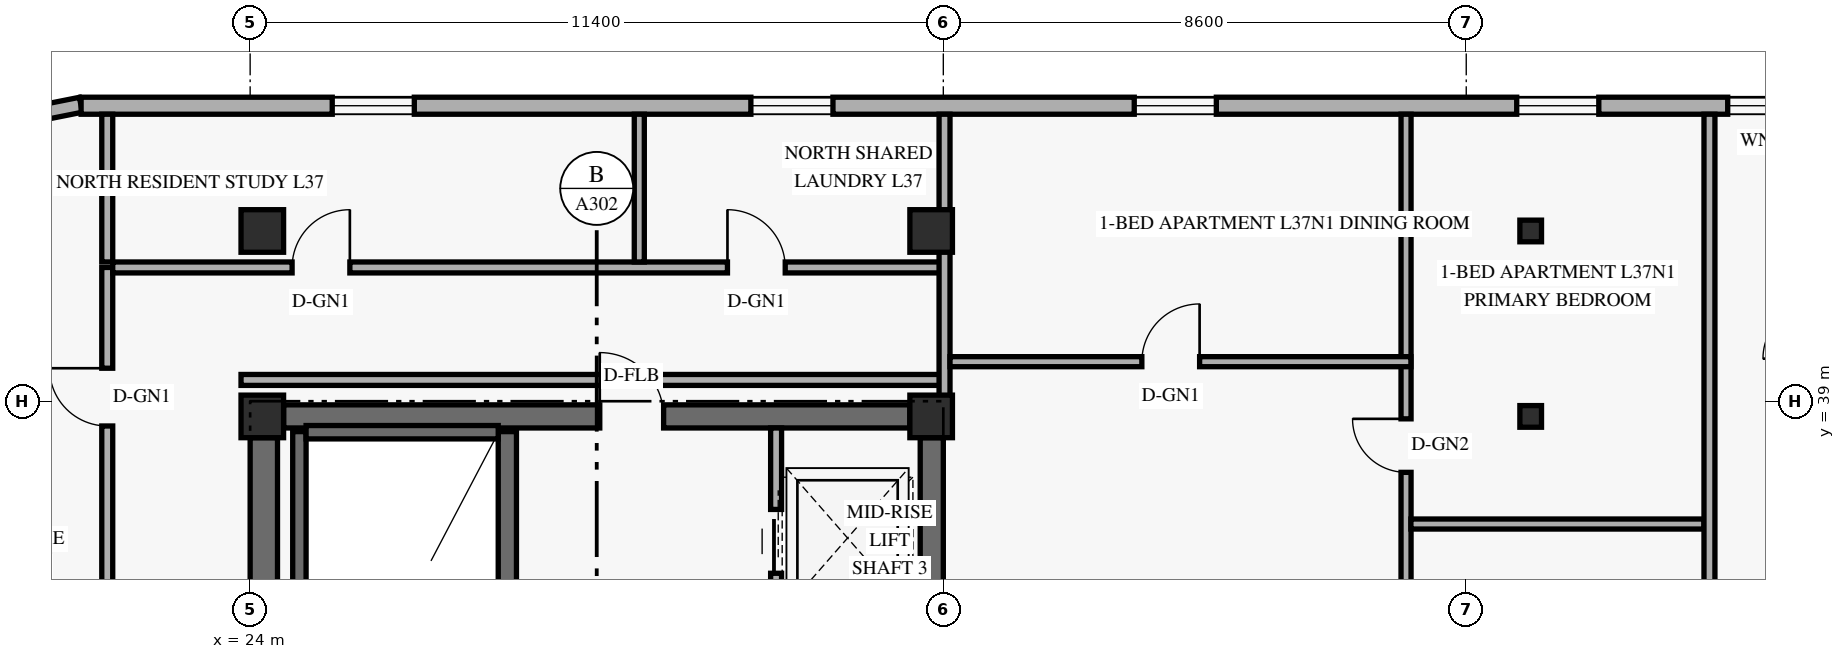
"""IFC4 building model, lengths in metres.
Left out: names, types, materials, properties, quantities, classifications, styles, units other than length and angle.
Written with IfcOpenShell. Run it as: python <this file> out.ifc"""

import sys

from ifc_helpers import new_model, si_unit, direction, frame, frame_2d, origin, origin_2d, place, context, subcontext, project, spatial, rectangle, hollow_rectangle, extrude, element, fill, save


model = new_model("IFC4")
c1 = context("Model", 3, precision=1e-05, world=origin(), true_north=direction((0.0, 1.0)))
c2 = subcontext(c1, "Body", "Model", "MODEL_VIEW")
j1 = project(units=[si_unit("LENGTHUNIT", "METRE"), si_unit("PLANEANGLEUNIT", "RADIAN")], contexts=[c1])
p1 = place(None, origin())
s1 = spatial("IfcSite", under=j1, at=p1, CompositionType="ELEMENT")
p2 = place(p1, origin())
s2 = spatial("IfcBuilding", under=s1, at=p2, CompositionType="ELEMENT")
p3 = place(p2, frame((0.0, 0.0, 144.6)))
s3 = spatial("IfcBuildingStorey", under=s2, at=p3, CompositionType="ELEMENT", Elevation=144.6)
p4 = place(p3, frame((24.225, 30.55, 0.0), z_axis=(0.0, 0.0, 1.0), x_axis=(0.0, 1.0, 0.0)))
e1 = element("IfcWall", 1, at=p4, inside=s3, PredefinedType="SHEAR", context=c2, shape_type="SweptSolid", body=[
    extrude(rectangle(XDim=7.85, YDim=0.45, at=frame_2d((3.925, 0.0))), origin(), (0.0, 0.0, 1.0), 2.748),
])
p5 = place(p3, frame((35.21, 31.35, 0.0), z_axis=(0.0, 0.0, 1.0), x_axis=(0.0, 1.0, 0.0)))
e2 = element("IfcWall", 2, at=p5, inside=s3, PredefinedType="SHEAR", context=c2, shape_type="SweptSolid", body=[
    extrude(rectangle(XDim=7.05, YDim=0.38, at=frame_2d((3.525, 0.0))), origin(), (0.0, 0.0, 1.0), 2.748),
])
p6 = place(p3, frame((24.55, 38.75, 0.0), z_axis=(0.0, 0.0, 1.0), x_axis=(1.0, 0.0, 0.0)))
e3 = element("IfcWall", 3, at=p6, inside=s3, PredefinedType="SHEAR", context=c2, shape_type="SweptSolid", body=[
    extrude(rectangle(XDim=10.3, YDim=0.38, at=frame_2d((5.15, 0.0))), origin(), (0.0, 0.0, 1.0), 3.36),
])
p7 = place(p6, frame((5.2, 0.0, 0.0)))
e4 = element("IfcOpeningElement", 4, at=p7, cuts=e3, PredefinedType="OPENING", context=c2, shape_type="SweptSolid", body=[
    extrude(rectangle(XDim=1.05, YDim=2.15, at=frame_2d((0.525, 1.075))), frame((0.0, 0.2, 0.0), z_axis=(0.0, -1.0, 0.0), x_axis=(1.0, 0.0, 0.0)), (0.0, 0.0, 1.0), 0.4),
])
p8 = place(p3, frame((24.81, 30.74, 0.0), z_axis=(0.0, 0.0, 1.0), x_axis=(0.0, 1.0, 0.0)))
e5 = element("IfcWall", 5, at=p8, inside=s3, PredefinedType="SHEAR", context=c2, shape_type="SweptSolid", body=[
    extrude(rectangle(XDim=7.76, YDim=0.22, at=frame_2d((3.88, 0.0))), origin(), (0.0, 0.0, 1.0), 3.36),
])
p9 = place(p3, frame((28.23, 30.74, 0.0), z_axis=(0.0, 0.0, 1.0), x_axis=(0.0, 1.0, 0.0)))
e6 = element("IfcWall", 6, at=p9, inside=s3, PredefinedType="SHEAR", context=c2, shape_type="SweptSolid", body=[
    extrude(rectangle(XDim=7.76, YDim=0.3, at=frame_2d((3.88, 0.0))), origin(), (0.0, 0.0, 1.0), 3.36),
])
p10 = place(p3, frame((24.92, 38.49, 0.0), z_axis=(0.0, 0.0, 1.0), x_axis=(1.0, 0.0, 0.0)))
e7 = element("IfcWall", 7, at=p10, inside=s3, PredefinedType="SHEAR", context=c2, shape_type="SweptSolid", body=[
    extrude(rectangle(XDim=3.16, YDim=0.22, at=frame_2d((1.58, 0.0))), origin(), (0.0, 0.0, 1.0), 3.36),
])
for number, where, z_axis, x_axis in (
    (8, (24.2, 38.75, 0.0), (0.0, 0.0, 1.0), (1.0, 0.0, 0.0)),
    (9, (24.2, 41.8, 0.0), (0.0, 0.0, 1.0), (1.0, 0.0, 0.0)),
    (10, (35.2, 38.75, 0.0), (0.0, 0.0, 1.0), (1.0, 0.0, 0.0)),
    (11, (35.2, 41.8, 0.0), (0.0, 0.0, 1.0), (1.0, 0.0, 0.0)),
):
    element("IfcColumn", number, at=place(p3, frame(where, z_axis=z_axis, x_axis=x_axis)), inside=s3, PredefinedType="COLUMN", context=c2, shape_type="SweptSolid", body=[
        extrude(rectangle(XDim=0.7, YDim=0.7, at=origin_2d()), origin(), (0.0, 0.0, 1.0), 3.6),
    ])
for number, where, z_axis, x_axis in (
    (12, (44.997, 38.75, 0.0), (0.035, 0.0, 0.999), (0.0, 1.0, 0.0)),
    (13, (44.997, 41.8, 0.0), (0.035, 0.0, 0.999), (0.0, 1.0, 0.0)),
):
    element("IfcColumn", number, at=place(p3, frame(where, z_axis=z_axis, x_axis=x_axis)), inside=s3, PredefinedType="COLUMN", context=c2, shape_type="SweptSolid", body=[
        extrude(hollow_rectangle(XDim=0.356, YDim=0.356, WallThickness=0.016, at=origin_2d()), origin(), (0.0, 0.0, 1.0), 3.602),
    ])
p11 = place(p3, frame((21.217, 43.876, 0.0), z_axis=(0.0, 0.0, 1.0), x_axis=(-0.980809899341, -0.19496651342, 0.0)))
e14 = element("IfcWall", 14, at=p11, inside=s3, PredefinedType="SOLIDWALL", context=c2, shape_type="SweptSolid", body=[
    extrude(rectangle(XDim=1.389, YDim=0.25, at=frame_2d((0.694, 0.0))), origin(), (0.0, 0.0, 1.0), 3.36),
])
p12 = place(p3, frame((54.98, 43.86, 0.0), z_axis=(0.0, 0.0, 1.0), x_axis=(-1.0, 0.0, 0.0)))
e15 = element("IfcWall", 15, at=p12, inside=s3, PredefinedType="SOLIDWALL", context=c2, shape_type="SweptSolid", body=[
    extrude(rectangle(XDim=33.76, YDim=0.28, at=frame_2d((16.88, 0.0))), origin(), (0.0, 0.0, 1.0), 3.36),
])
p13 = place(p12, frame((28.28, 0.0, 0.85)))
e16 = element("IfcOpeningElement", 16, at=p13, cuts=e15, PredefinedType="OPENING", context=c2, shape_type="SweptSolid", body=[
    extrude(rectangle(XDim=1.35, YDim=1.55, at=frame_2d((0.675, 0.775))), frame((0.0, 0.15, 0.0), z_axis=(0.0, -1.0, 0.0), x_axis=(1.0, 0.0, 0.0)), (0.0, 0.0, 1.0), 0.3),
])
p14 = place(p12, frame((21.395, 0.0, 0.85)))
e17 = element("IfcOpeningElement", 17, at=p14, cuts=e15, PredefinedType="OPENING", context=c2, shape_type="SweptSolid", body=[
    extrude(rectangle(XDim=1.35, YDim=1.55, at=frame_2d((0.675, 0.775))), frame((0.0, 0.15, 0.0), z_axis=(0.0, -1.0, 0.0), x_axis=(1.0, 0.0, 0.0)), (0.0, 0.0, 1.0), 0.3),
])
p15 = place(p12, frame((15.09, 0.0, 0.85)))
e18 = element("IfcOpeningElement", 18, at=p15, cuts=e15, PredefinedType="OPENING", context=c2, shape_type="SweptSolid", body=[
    extrude(rectangle(XDim=1.35, YDim=1.55, at=frame_2d((0.675, 0.775))), frame((0.0, 0.15, 0.0), z_axis=(0.0, -1.0, 0.0), x_axis=(1.0, 0.0, 0.0)), (0.0, 0.0, 1.0), 0.3),
])
p16 = place(p12, frame((8.8, 0.0, 0.85)))
e19 = element("IfcOpeningElement", 19, at=p16, cuts=e15, PredefinedType="OPENING", context=c2, shape_type="SweptSolid", body=[
    extrude(rectangle(XDim=1.35, YDim=1.55, at=frame_2d((0.675, 0.775))), frame((0.0, 0.15, 0.0), z_axis=(0.0, -1.0, 0.0), x_axis=(1.0, 0.0, 0.0)), (0.0, 0.0, 1.0), 0.3),
])
p17 = place(p12, frame((5.48, 0.0, 0.85)))
e20 = element("IfcOpeningElement", 20, at=p17, cuts=e15, PredefinedType="OPENING", context=c2, shape_type="SweptSolid", body=[
    extrude(rectangle(XDim=1.2, YDim=1.5, at=frame_2d((0.6, 0.75))), frame((0.0, 0.15, 0.0), z_axis=(0.0, -1.0, 0.0), x_axis=(1.0, 0.0, 0.0)), (0.0, 0.0, 1.0), 0.3),
])
p18 = place(p12, frame((1.915, 0.0, 0.85)))
e21 = element("IfcOpeningElement", 21, at=p18, cuts=e15, PredefinedType="OPENING", context=c2, shape_type="SweptSolid", body=[
    extrude(rectangle(XDim=1.35, YDim=1.55, at=frame_2d((0.675, 0.775))), frame((0.0, 0.15, 0.0), z_axis=(0.0, -1.0, 0.0), x_axis=(1.0, 0.0, 0.0)), (0.0, 0.0, 1.0), 0.3),
])
p19 = place(p3, frame((32.65, 31.35, 0.0), z_axis=(0.0, 0.0, 1.0), x_axis=(0.0, 1.0, 0.0)))
e22 = element("IfcWall", 22, at=p19, inside=s3, PredefinedType="STANDARD", context=c2, shape_type="SweptSolid", body=[
    extrude(rectangle(XDim=7.21, YDim=0.18, at=frame_2d((3.605, 0.0))), origin(), (0.0, 0.0, 1.0), 3.36),
])
p20 = place(p19, frame((0.52, 0.0, 0.0)))
e23 = element("IfcOpeningElement", 23, at=p20, cuts=e22, PredefinedType="OPENING", context=c2, shape_type="SweptSolid", body=[
    extrude(rectangle(XDim=1.05, YDim=2.2, at=frame_2d((0.525, 1.1))), frame((0.0, 0.1, 0.0), z_axis=(0.0, -1.0, 0.0), x_axis=(1.0, 0.0, 0.0)), (0.0, 0.0, 1.0), 0.2),
])
p21 = place(p19, frame((2.67, 0.0, 0.0)))
e24 = element("IfcOpeningElement", 24, at=p21, cuts=e22, PredefinedType="OPENING", context=c2, shape_type="SweptSolid", body=[
    extrude(rectangle(XDim=1.05, YDim=2.2, at=frame_2d((0.525, 1.1))), frame((0.0, 0.1, 0.0), z_axis=(0.0, -1.0, 0.0), x_axis=(1.0, 0.0, 0.0)), (0.0, 0.0, 1.0), 0.2),
])
p22 = place(p19, frame((4.82, 0.0, 0.0)))
e25 = element("IfcOpeningElement", 25, at=p22, cuts=e22, PredefinedType="OPENING", context=c2, shape_type="SweptSolid", body=[
    extrude(rectangle(XDim=1.05, YDim=2.2, at=frame_2d((0.525, 1.1))), frame((0.0, 0.1, 0.0), z_axis=(0.0, -1.0, 0.0), x_axis=(1.0, 0.0, 0.0)), (0.0, 0.0, 1.0), 0.2),
])
p23 = place(p3, frame((21.65, 6.8, 0.0), z_axis=(0.0, 0.0, 1.0), x_axis=(0.0, 1.0, 0.0)))
e26 = element("IfcWall", 26, at=p23, inside=s3, PredefinedType="STANDARD", context=c2, shape_type="SweptSolid", body=[
    extrude(rectangle(XDim=34.4, YDim=0.18, at=frame_2d((17.2, 0.0))), origin(), (0.0, 0.0, 1.0), 2.73),
])
p24 = place(p23, frame((1.883, 0.0, 0.0)))
e27 = element("IfcOpeningElement", 27, at=p24, cuts=e26, PredefinedType="OPENING", context=c2, shape_type="SweptSolid", body=[
    extrude(rectangle(XDim=0.95, YDim=2.15, at=frame_2d((0.475, 1.075))), frame((0.0, 0.1, 0.0), z_axis=(0.0, -1.0, 0.0), x_axis=(1.0, 0.0, 0.0)), (0.0, 0.0, 1.0), 0.2),
])
p25 = place(p23, frame((12.117, 0.0, 0.0)))
e28 = element("IfcOpeningElement", 28, at=p25, cuts=e26, PredefinedType="OPENING", context=c2, shape_type="SweptSolid", body=[
    extrude(rectangle(XDim=0.95, YDim=2.15, at=frame_2d((0.475, 1.075))), frame((0.0, 0.1, 0.0), z_axis=(0.0, -1.0, 0.0), x_axis=(1.0, 0.0, 0.0)), (0.0, 0.0, 1.0), 0.2),
])
p26 = place(p23, frame((22.357, 0.0, 0.0)))
e29 = element("IfcOpeningElement", 29, at=p26, cuts=e26, PredefinedType="OPENING", context=c2, shape_type="SweptSolid", body=[
    extrude(rectangle(XDim=0.95, YDim=2.15, at=frame_2d((0.475, 1.075))), frame((0.0, 0.1, 0.0), z_axis=(0.0, -1.0, 0.0), x_axis=(1.0, 0.0, 0.0)), (0.0, 0.0, 1.0), 0.2),
])
p27 = place(p23, frame((31.792, 0.0, 0.0)))
e30 = element("IfcOpeningElement", 30, at=p27, cuts=e26, PredefinedType="OPENING", context=c2, shape_type="SweptSolid", body=[
    extrude(rectangle(XDim=0.95, YDim=2.15, at=frame_2d((0.475, 1.075))), frame((0.0, 0.1, 0.0), z_axis=(0.0, -1.0, 0.0), x_axis=(1.0, 0.0, 0.0)), (0.0, 0.0, 1.0), 0.2),
])
p28 = place(p3, frame((21.74, 41.2, 0.0), z_axis=(0.0, 0.0, 1.0), x_axis=(1.0, 0.0, 0.0)))
e31 = element("IfcWall", 31, at=p28, inside=s3, PredefinedType="STANDARD", context=c2, shape_type="SweptSolid", body=[
    extrude(rectangle(XDim=13.68, YDim=0.18, at=frame_2d((6.84, 0.0))), origin(), (0.0, 0.0, 1.0), 2.73),
])
p29 = place(p28, frame((2.95, 0.0, 0.0)))
e32 = element("IfcOpeningElement", 32, at=p29, cuts=e31, PredefinedType="OPENING", context=c2, shape_type="SweptSolid", body=[
    extrude(rectangle(XDim=0.95, YDim=2.15, at=frame_2d((0.475, 1.075))), frame((0.0, 0.1, 0.0), z_axis=(0.0, -1.0, 0.0), x_axis=(1.0, 0.0, 0.0)), (0.0, 0.0, 1.0), 0.2),
])
p30 = place(p28, frame((10.11, 0.0, 0.0)))
e33 = element("IfcOpeningElement", 33, at=p30, cuts=e31, PredefinedType="OPENING", context=c2, shape_type="SweptSolid", body=[
    extrude(rectangle(XDim=0.95, YDim=2.15, at=frame_2d((0.475, 1.075))), frame((0.0, 0.1, 0.0), z_axis=(0.0, -1.0, 0.0), x_axis=(1.0, 0.0, 0.0)), (0.0, 0.0, 1.0), 0.2),
])
p31 = place(p3, frame((23.85, 39.35, 0.0), z_axis=(0.0, 0.0, 1.0), x_axis=(1.0, 0.0, 0.0)))
e34 = element("IfcWall", 34, at=p31, inside=s3, PredefinedType="STANDARD", context=c2, shape_type="SweptSolid", body=[
    extrude(rectangle(XDim=11.57, YDim=0.18, at=frame_2d((5.785, 0.0))), origin(), (0.0, 0.0, 1.0), 2.73),
])
p32 = place(p3, frame((21.65, 41.29, 0.0), z_axis=(0.0, 0.0, 1.0), x_axis=(0.0, 1.0, 0.0)))
e35 = element("IfcWall", 35, at=p32, inside=s3, PredefinedType="PARTITIONING", context=c2, shape_type="SweptSolid", body=[
    extrude(rectangle(XDim=2.43, YDim=0.18, at=frame_2d((1.215, 0.0))), origin(), (0.0, 0.0, 1.0), 2.879),
])
p33 = place(p3, frame((35.42, 38.75, 0.0), z_axis=(0.0, 0.0, 1.0), x_axis=(0.0, 1.0, 0.0)))
e36 = element("IfcWall", 36, at=p33, inside=s3, PredefinedType="PARTITIONING", context=c2, shape_type="SweptSolid", body=[
    extrude(rectangle(XDim=4.97, YDim=0.18, at=frame_2d((2.485, 0.0))), origin(), (0.0, 0.0, 1.0), 2.73),
])
p34 = place(p3, frame((43.01, 29.55, 0.0), z_axis=(0.0, 0.0, 1.0), x_axis=(0.0, 1.0, 0.0)))
e37 = element("IfcWall", 37, at=p34, inside=s3, PredefinedType="PARTITIONING", context=c2, shape_type="SweptSolid", body=[
    extrude(rectangle(XDim=14.17, YDim=0.165, at=frame_2d((7.085, 0.0))), origin(), (0.0, 0.0, 1.0), 2.73),
])
p35 = place(p34, frame((4.593, 0.0, 0.0)))
e38 = element("IfcOpeningElement", 38, at=p35, cuts=e37, PredefinedType="OPENING", context=c2, shape_type="SweptSolid", body=[
    extrude(rectangle(XDim=0.88, YDim=2.14, at=frame_2d((0.44, 1.07))), frame((0.0, 0.093, 0.0), z_axis=(0.0, -1.0, 0.0), x_axis=(1.0, 0.0, 0.0)), (0.0, 0.0, 1.0), 0.185),
])
p36 = place(p34, frame((8.28, 0.0, 0.0)))
e39 = element("IfcOpeningElement", 39, at=p36, cuts=e37, PredefinedType="OPENING", context=c2, shape_type="SweptSolid", body=[
    extrude(rectangle(XDim=0.88, YDim=2.12, at=frame_2d((0.44, 1.06))), frame((0.0, 0.093, 0.0), z_axis=(0.0, -1.0, 0.0), x_axis=(1.0, 0.0, 0.0)), (0.0, 0.0, 1.0), 0.185),
])
p37 = place(p3, frame((35.51, 39.65, 0.0), z_axis=(0.0, 0.0, 1.0), x_axis=(1.0, 0.0, 0.0)))
e40 = element("IfcWall", 40, at=p37, inside=s3, PredefinedType="PARTITIONING", context=c2, shape_type="SweptSolid", body=[
    extrude(rectangle(XDim=7.58, YDim=0.165, at=frame_2d((3.79, 0.0))), origin(), (0.0, 0.0, 1.0), 3.36),
])
p38 = place(p37, frame((3.155, 0.0, 0.0)))
e41 = element("IfcOpeningElement", 41, at=p38, cuts=e40, PredefinedType="OPENING", context=c2, shape_type="SweptSolid", body=[
    extrude(rectangle(XDim=0.95, YDim=2.15, at=frame_2d((0.475, 1.075))), frame((0.0, 0.093, 0.0), z_axis=(0.0, -1.0, 0.0), x_axis=(1.0, 0.0, 0.0)), (0.0, 0.0, 1.0), 0.185),
])
p39 = place(p3, frame((43.09, 36.98, 0.0), z_axis=(0.0, 0.0, 1.0), x_axis=(1.0, 0.0, 0.0)))
e42 = element("IfcWall", 42, at=p39, inside=s3, PredefinedType="PARTITIONING", context=c2, shape_type="SweptSolid", body=[
    extrude(rectangle(XDim=4.82, YDim=0.165, at=frame_2d((2.41, 0.0))), origin(), (0.0, 0.0, 1.0), 2.73),
])
p40 = place(p3, frame((48.0, 29.55, 0.0), z_axis=(0.0, 0.0, 1.0), x_axis=(0.0, 1.0, 0.0)))
e43 = element("IfcWall", 43, at=p40, inside=s3, PredefinedType="STANDARD", context=c2, shape_type="SweptSolid", body=[
    extrude(rectangle(XDim=14.17, YDim=0.18, at=frame_2d((7.085, 0.0))), origin(), (0.0, 0.0, 1.0), 2.73),
])
p41 = place(p3, frame((30.4, 41.29, 0.0), z_axis=(0.0, 0.0, 1.0), x_axis=(0.0, 1.0, 0.0)))
e44 = element("IfcWall", 44, at=p41, inside=s3, PredefinedType="PARTITIONING", context=c2, shape_type="SweptSolid", body=[
    extrude(rectangle(XDim=2.43, YDim=0.165, at=frame_2d((1.215, 0.0))), origin(), (0.0, 0.0, 1.0), 2.879),
])
p42 = place(p13, origin())
e45 = element("IfcWindow", 45, at=p42, inside=s3, PartitioningType="SINGLE_PANEL", PredefinedType="WINDOW", context=c2, shape_type="SweptSolid", body=[
    extrude(rectangle(XDim=1.35, YDim=1.55, at=frame_2d((0.675, 0.775))), frame((0.0, 0.03, 0.0), z_axis=(0.0, -1.0, 0.0), x_axis=(1.0, 0.0, 0.0)), (0.0, 0.0, 1.0), 0.06),
])
fill(e16, e45)
p43 = place(p14, origin())
e46 = element("IfcWindow", 46, at=p43, inside=s3, PartitioningType="SINGLE_PANEL", PredefinedType="WINDOW", context=c2, shape_type="SweptSolid", body=[
    extrude(rectangle(XDim=1.35, YDim=1.55, at=frame_2d((0.675, 0.775))), frame((0.0, 0.03, 0.0), z_axis=(0.0, -1.0, 0.0), x_axis=(1.0, 0.0, 0.0)), (0.0, 0.0, 1.0), 0.06),
])
fill(e17, e46)
p44 = place(p15, origin())
e47 = element("IfcWindow", 47, at=p44, inside=s3, PartitioningType="SINGLE_PANEL", PredefinedType="WINDOW", context=c2, shape_type="SweptSolid", body=[
    extrude(rectangle(XDim=1.35, YDim=1.55, at=frame_2d((0.675, 0.775))), frame((0.0, 0.03, 0.0), z_axis=(0.0, -1.0, 0.0), x_axis=(1.0, 0.0, 0.0)), (0.0, 0.0, 1.0), 0.06),
])
fill(e18, e47)
p45 = place(p16, origin())
e48 = element("IfcWindow", 48, at=p45, inside=s3, PartitioningType="SINGLE_PANEL", PredefinedType="WINDOW", context=c2, shape_type="SweptSolid", body=[
    extrude(rectangle(XDim=1.35, YDim=1.55, at=frame_2d((0.675, 0.775))), frame((0.0, 0.03, 0.0), z_axis=(0.0, -1.0, 0.0), x_axis=(1.0, 0.0, 0.0)), (0.0, 0.0, 1.0), 0.06),
])
fill(e19, e48)
p46 = place(p17, origin())
e49 = element("IfcWindow", 49, at=p46, inside=s3, PartitioningType="SINGLE_PANEL", PredefinedType="WINDOW", context=c2, shape_type="SweptSolid", body=[
    extrude(rectangle(XDim=1.2, YDim=1.5, at=frame_2d((0.6, 0.75))), frame((0.0, 0.03, 0.0), z_axis=(0.0, -1.0, 0.0), x_axis=(1.0, 0.0, 0.0)), (0.0, 0.0, 1.0), 0.06),
])
fill(e20, e49)
p47 = place(p22, origin())
e50 = element("IfcDoor", 50, at=p47, inside=s3, OperationType="SLIDING_TO_LEFT", PredefinedType="DOOR", context=c2, shape_type="SweptSolid", body=[
    extrude(rectangle(XDim=1.05, YDim=2.2, at=frame_2d((0.525, 1.1))), frame((0.0, 0.025, 0.0), z_axis=(0.0, -1.0, 0.0), x_axis=(1.0, 0.0, 0.0)), (0.0, 0.0, 1.0), 0.05),
])
fill(e25, e50)
p48 = place(p7, frame((1.05, 0.0, 0.0), z_axis=(0.0, 0.0, 1.0), x_axis=(-1.0, 0.0, 0.0)))
e51 = element("IfcDoor", 51, at=p48, inside=s3, OperationType="SINGLE_SWING_RIGHT", PredefinedType="DOOR", context=c2, shape_type="SweptSolid", body=[
    extrude(rectangle(XDim=1.05, YDim=2.15, at=frame_2d((0.525, 1.075))), frame((0.0, 0.025, 0.0), z_axis=(0.0, -1.0, 0.0), x_axis=(1.0, 0.0, 0.0)), (0.0, 0.0, 1.0), 0.05),
])
fill(e4, e51)
p49 = place(p38, origin())
e52 = element("IfcDoor", 52, at=p49, inside=s3, OperationType="SINGLE_SWING_RIGHT", PredefinedType="DOOR", context=c2, shape_type="SweptSolid", body=[
    extrude(rectangle(XDim=0.95, YDim=2.15, at=frame_2d((0.475, 1.075))), frame((0.0, 0.025, 0.0), z_axis=(0.0, -1.0, 0.0), x_axis=(1.0, 0.0, 0.0)), (0.0, 0.0, 1.0), 0.05),
])
fill(e41, e52)
p50 = place(p36, origin())
e53 = element("IfcDoor", 53, at=p50, inside=s3, OperationType="SINGLE_SWING_RIGHT", PredefinedType="DOOR", context=c2, shape_type="SweptSolid", body=[
    extrude(rectangle(XDim=0.88, YDim=2.12, at=frame_2d((0.44, 1.06))), frame((0.0, 0.025, 0.0), z_axis=(0.0, -1.0, 0.0), x_axis=(1.0, 0.0, 0.0)), (0.0, 0.0, 1.0), 0.05),
])
fill(e39, e53)
p51 = place(p27, origin())
e54 = element("IfcDoor", 54, at=p51, inside=s3, OperationType="SINGLE_SWING_RIGHT", PredefinedType="DOOR", context=c2, shape_type="SweptSolid", body=[
    extrude(rectangle(XDim=0.95, YDim=2.15, at=frame_2d((0.475, 1.075))), frame((0.0, 0.025, 0.0), z_axis=(0.0, -1.0, 0.0), x_axis=(1.0, 0.0, 0.0)), (0.0, 0.0, 1.0), 0.05),
])
fill(e30, e54)
p52 = place(p29, origin())
e55 = element("IfcDoor", 55, at=p52, inside=s3, OperationType="SINGLE_SWING_RIGHT", PredefinedType="DOOR", context=c2, shape_type="SweptSolid", body=[
    extrude(rectangle(XDim=0.95, YDim=2.15, at=frame_2d((0.475, 1.075))), frame((0.0, 0.025, 0.0), z_axis=(0.0, -1.0, 0.0), x_axis=(1.0, 0.0, 0.0)), (0.0, 0.0, 1.0), 0.05),
])
fill(e32, e55)
p53 = place(p30, origin())
e56 = element("IfcDoor", 56, at=p53, inside=s3, OperationType="SINGLE_SWING_LEFT", PredefinedType="DOOR", context=c2, shape_type="SweptSolid", body=[
    extrude(rectangle(XDim=0.95, YDim=2.15, at=frame_2d((0.475, 1.075))), frame((0.0, 0.025, 0.0), z_axis=(0.0, -1.0, 0.0), x_axis=(1.0, 0.0, 0.0)), (0.0, 0.0, 1.0), 0.05),
])
fill(e33, e56)
save(model, sys.argv[1])
